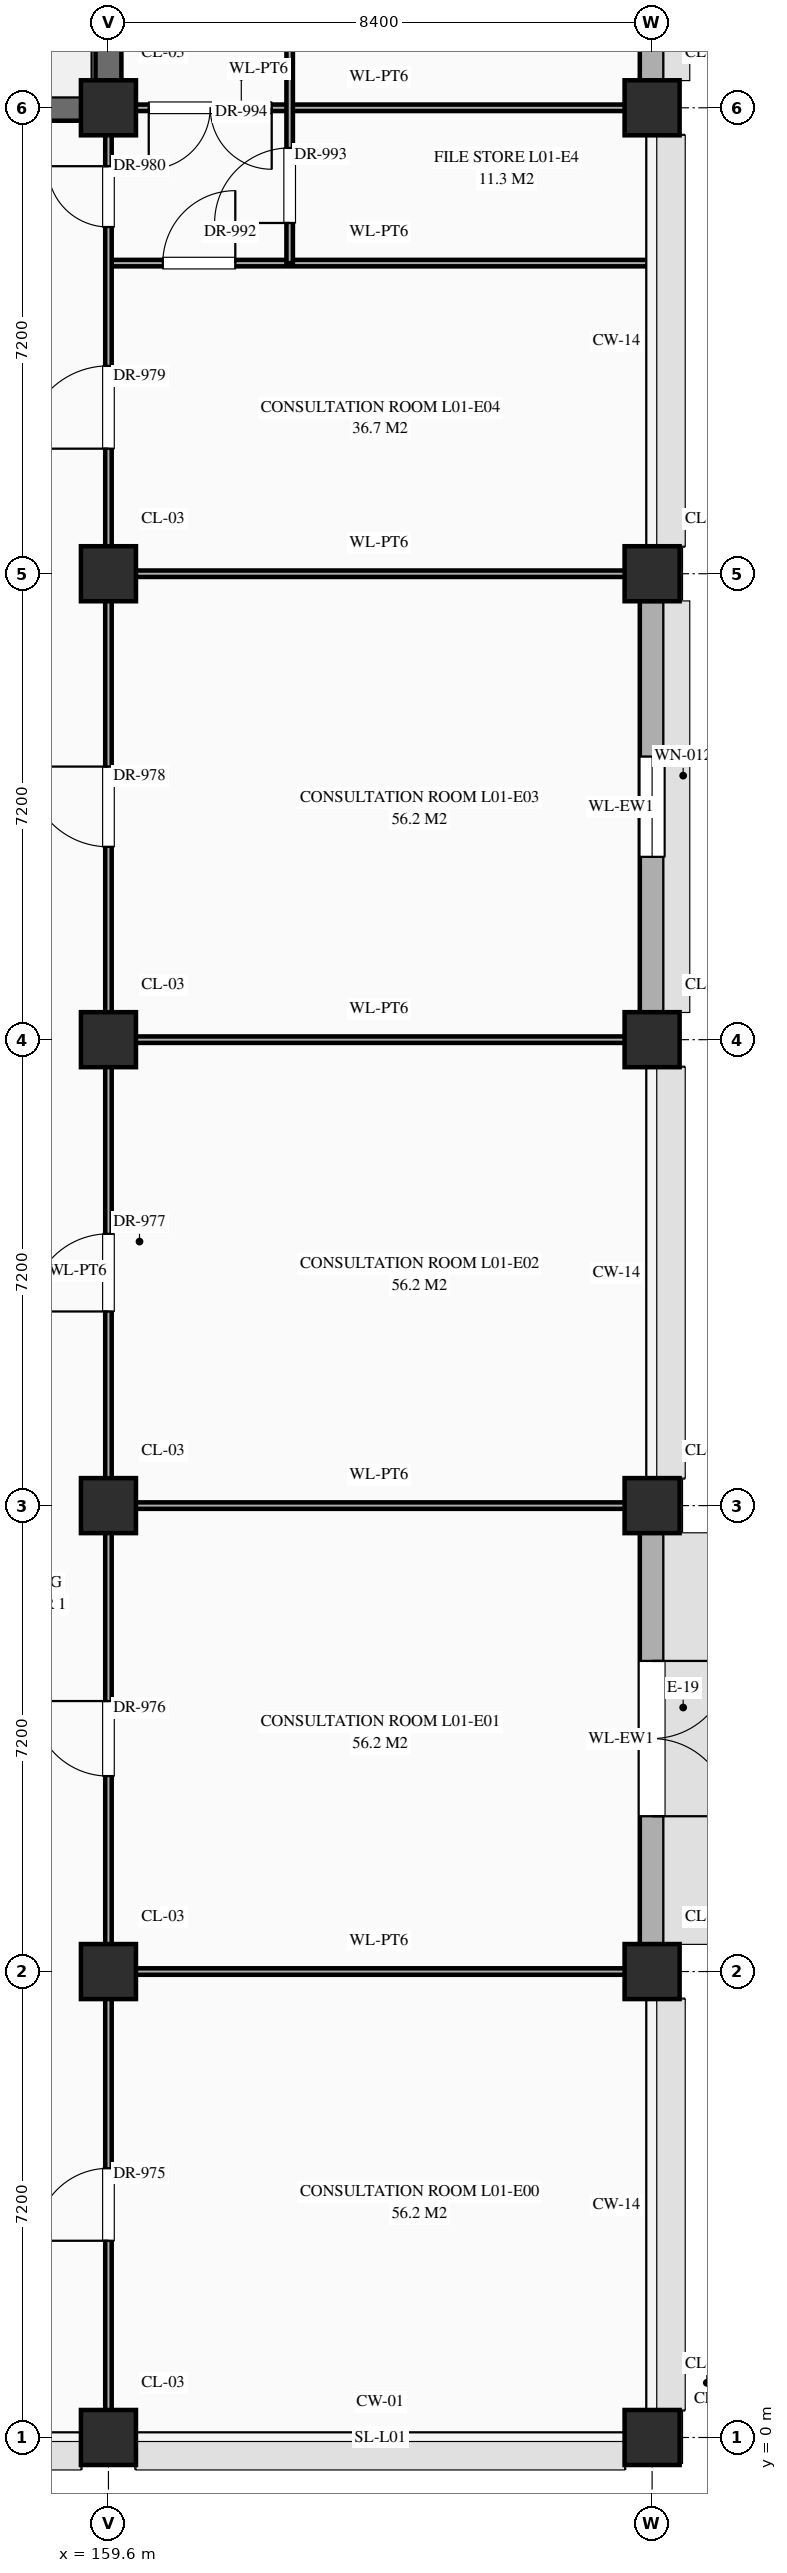
"""IFC4 building model, lengths in metres.
Left out: names, types, materials, properties, quantities, classifications, styles, units other than length and angle.
Written with IfcOpenShell. Run it as: python <this file> out.ifc"""

import sys

from ifc_helpers import new_model, si_unit, direction, frame, frame_2d, origin, origin_2d, place, context, subcontext, project, spatial, rectangle, extrude, element, fill, save


model = new_model("IFC4")
c1 = context("Model", 3, precision=1e-05, world=origin(), true_north=direction((0.0, 1.0)))
c2 = subcontext(c1, "Body", "Model", "MODEL_VIEW")
j1 = project(units=[si_unit("LENGTHUNIT", "METRE"), si_unit("PLANEANGLEUNIT", "RADIAN")], contexts=[c1])
p1 = place(None, origin())
s1 = spatial("IfcSite", under=j1, at=p1, CompositionType="ELEMENT")
p2 = place(p1, origin())
s2 = spatial("IfcBuilding", under=s1, at=p2, CompositionType="ELEMENT")
p3 = place(p2, origin())
s3 = spatial("IfcBuildingStorey", under=s2, at=p3, CompositionType="ELEMENT", Elevation=0.0)
for number, where, z_axis, x_axis in (
    (1, (159.6, 0.0, 0.0), (0.0, 0.0, 1.0), (1.0, 0.0, 0.0)),
    (2, (159.6, 7.2, 0.0), (0.0, 0.0, 1.0), (1.0, 0.0, 0.0)),
    (3, (159.6, 14.4, 0.0), (0.0, 0.0, 1.0), (1.0, 0.0, 0.0)),
    (4, (159.6, 21.6, 0.0), (0.0, 0.0, 1.0), (1.0, 0.0, 0.0)),
    (5, (159.6, 28.8, 0.0), (0.0, 0.0, 1.0), (1.0, 0.0, 0.0)),
    (6, (159.6, 36.0, 0.0), (0.0, 0.0, 1.0), (1.0, 0.0, 0.0)),
    (7, (168.0, 0.0, 0.0), (0.0, 0.0, 1.0), (1.0, 0.0, 0.0)),
    (8, (168.0, 7.2, 0.0), (0.0, 0.0, 1.0), (1.0, 0.0, 0.0)),
    (9, (168.0, 14.4, 0.0), (0.0, 0.0, 1.0), (1.0, 0.0, 0.0)),
    (10, (168.0, 21.6, 0.0), (0.0, 0.0, 1.0), (1.0, 0.0, 0.0)),
    (11, (168.0, 28.8, 0.0), (0.0, 0.0, 1.0), (1.0, 0.0, 0.0)),
    (12, (168.0, 36.0, 0.0), (0.0, 0.0, 1.0), (1.0, 0.0, 0.0)),
):
    element("IfcColumn", number, at=place(p3, frame(where, z_axis=z_axis, x_axis=x_axis)), inside=s3, PredefinedType="COLUMN", context=c2, shape_type="SweptSolid", body=[
        extrude(rectangle(XDim=0.85, YDim=0.85, at=origin_2d()), origin(), (0.0, 0.0, 1.0), 5.4),
    ])
p4 = place(p3, frame((168.0, 7.62, 0.0), z_axis=(0.0, 0.0, 1.0), x_axis=(0.0, 1.0, 0.0)))
e13 = element("IfcWall", 13, at=p4, inside=s3, PredefinedType="STANDARD", context=c2, shape_type="SweptSolid", body=[
    extrude(rectangle(XDim=6.36, YDim=0.38, at=frame_2d((3.18, 0.0))), origin(), (0.0, 0.0, 1.0), 4.47),
])
p5 = place(p4, frame((1.98, 0.0, 0.0)))
e14 = element("IfcOpeningElement", 14, at=p5, cuts=e13, PredefinedType="OPENING", context=c2, shape_type="SweptSolid", body=[
    extrude(rectangle(XDim=2.4, YDim=2.4, at=frame_2d((1.2, 1.2))), frame((0.0, 0.202, 0.0), z_axis=(0.0, -1.0, 0.0), x_axis=(1.0, 0.0, 0.0)), (0.0, 0.0, 1.0), 0.404),
])
p6 = place(p3, frame((168.0, 22.02, 0.0), z_axis=(0.0, 0.0, 1.0), x_axis=(0.0, 1.0, 0.0)))
e15 = element("IfcWall", 15, at=p6, inside=s3, PredefinedType="STANDARD", context=c2, shape_type="SweptSolid", body=[
    extrude(rectangle(XDim=6.36, YDim=0.38, at=frame_2d((3.18, 0.0))), origin(), (0.0, 0.0, 1.0), 4.47),
])
p7 = place(p6, frame((2.405, 0.0, 0.85)))
e16 = element("IfcOpeningElement", 16, at=p7, cuts=e15, PredefinedType="OPENING", context=c2, shape_type="SweptSolid", body=[
    extrude(rectangle(XDim=1.55, YDim=1.92, at=frame_2d((0.775, 0.96))), frame((0.0, 0.202, 0.0), z_axis=(0.0, -1.0, 0.0), x_axis=(1.0, 0.0, 0.0)), (0.0, 0.0, 1.0), 0.404),
])
p8 = place(p3, frame((168.0, 36.42, 0.0), z_axis=(0.0, 0.0, 1.0), x_axis=(0.0, 1.0, 0.0)))
e17 = element("IfcWall", 17, at=p8, inside=s3, PredefinedType="STANDARD", context=c2, shape_type="SweptSolid", body=[
    extrude(rectangle(XDim=6.36, YDim=0.38, at=frame_2d((3.18, 0.0))), origin(), (0.0, 0.0, 1.0), 4.47),
])
p9 = place(p8, frame((2.28, 0.0, 0.85)))
e18 = element("IfcOpeningElement", 18, at=p9, cuts=e17, PredefinedType="OPENING", context=c2, shape_type="SweptSolid", body=[
    extrude(rectangle(XDim=1.8, YDim=1.2, at=frame_2d((0.9, 0.6))), frame((0.0, 0.202, 0.0), z_axis=(0.0, -1.0, 0.0), x_axis=(1.0, 0.0, 0.0)), (0.0, 0.0, 1.0), 0.404),
])
for number, where, z_axis, x_axis in (
    (19, (159.6, 7.2, 0.0), (0.0, 0.0, 1.0), (1.0, 0.0, 0.0)),
    (20, (159.6, 14.4, 0.0), (0.0, 0.0, 1.0), (1.0, 0.0, 0.0)),
    (21, (159.6, 21.6, 0.0), (0.0, 0.0, 1.0), (1.0, 0.0, 0.0)),
    (22, (159.6, 28.8, 0.0), (0.0, 0.0, 1.0), (1.0, 0.0, 0.0)),
):
    element("IfcWall", number, at=place(p3, frame(where, z_axis=z_axis, x_axis=x_axis)), inside=s3, PredefinedType="STANDARD", context=c2, shape_type="SweptSolid", body=[
        extrude(rectangle(XDim=8.36, YDim=0.1, at=frame_2d((4.18, 0.0))), origin(), (0.0, 0.0, 1.0), 4.27),
    ])
p10 = place(p3, frame((159.6, 33.6, 0.0), z_axis=(0.0, 0.0, 1.0), x_axis=(1.0, 0.0, 0.0)))
e23 = element("IfcWall", 23, at=p10, inside=s3, PredefinedType="STANDARD", context=c2, shape_type="SweptSolid", body=[
    extrude(rectangle(XDim=8.36, YDim=0.1, at=frame_2d((4.18, 0.0))), origin(), (0.0, 0.0, 1.0), 5.12),
])
p11 = place(p10, frame((0.84, 0.0, 0.0)))
e24 = element("IfcOpeningElement", 24, at=p11, cuts=e23, PredefinedType="OPENING", context=c2, shape_type="SweptSolid", body=[
    extrude(rectangle(XDim=1.12, YDim=2.25, at=frame_2d((0.56, 1.125))), frame((0.0, 0.062, 0.0), z_axis=(0.0, -1.0, 0.0), x_axis=(1.0, 0.0, 0.0)), (0.0, 0.0, 1.0), 0.124),
])
p12 = place(p3, frame((151.24, 36.0, 0.0), z_axis=(0.0, 0.0, 1.0), x_axis=(1.0, 0.0, 0.0)))
e25 = element("IfcWall", 25, at=p12, inside=s3, PredefinedType="SHEAR", context=c2, shape_type="SweptSolid", body=[
    extrude(rectangle(XDim=8.36, YDim=0.4, at=frame_2d((4.18, 0.0))), origin(), (0.0, 0.0, 1.0), 5.12),
])
p13 = place(p3, frame((159.6, 36.0, 0.0), z_axis=(0.0, 0.0, 1.0), x_axis=(1.0, 0.0, 0.0)))
e26 = element("IfcWall", 26, at=p13, inside=s3, PredefinedType="STANDARD", context=c2, shape_type="SweptSolid", body=[
    extrude(rectangle(XDim=8.36, YDim=0.1, at=frame_2d((4.18, 0.0))), origin(), (0.0, 0.0, 1.0), 4.27),
])
p14 = place(p13, frame((0.623, 0.0, 0.0)))
e27 = element("IfcOpeningElement", 27, at=p14, cuts=e26, PredefinedType="OPENING", context=c2, shape_type="SweptSolid", body=[
    extrude(rectangle(XDim=1.9, YDim=2.5, at=frame_2d((0.95, 1.25))), frame((0.0, 0.062, 0.0), z_axis=(0.0, -1.0, 0.0), x_axis=(1.0, 0.0, 0.0)), (0.0, 0.0, 1.0), 0.124),
])
p15 = place(p3, frame((159.6, 0.04, 0.0), z_axis=(0.0, 0.0, 1.0), x_axis=(0.0, 1.0, 0.0)))
e28 = element("IfcWall", 28, at=p15, inside=s3, PredefinedType="STANDARD", context=c2, shape_type="SweptSolid", body=[
    extrude(rectangle(XDim=35.96, YDim=0.1, at=frame_2d((17.98, 0.0))), origin(), (0.0, 0.0, 1.0), 4.37),
])
p16 = place(p15, frame((3.0, 0.0, 0.0)))
e29 = element("IfcOpeningElement", 29, at=p16, cuts=e28, PredefinedType="OPENING", context=c2, shape_type="SweptSolid", body=[
    extrude(rectangle(XDim=1.12, YDim=2.25, at=frame_2d((0.56, 1.125))), frame((0.0, 0.062, 0.0), z_axis=(0.0, -1.0, 0.0), x_axis=(1.0, 0.0, 0.0)), (0.0, 0.0, 1.0), 0.124),
])
p17 = place(p15, frame((10.18, 0.0, 0.0)))
e30 = element("IfcOpeningElement", 30, at=p17, cuts=e28, PredefinedType="OPENING", context=c2, shape_type="SweptSolid", body=[
    extrude(rectangle(XDim=1.16, YDim=2.3, at=frame_2d((0.58, 1.15))), frame((0.0, 0.062, 0.0), z_axis=(0.0, -1.0, 0.0), x_axis=(1.0, 0.0, 0.0)), (0.0, 0.0, 1.0), 0.124),
])
p18 = place(p15, frame((17.36, 0.0, 0.0)))
e31 = element("IfcOpeningElement", 31, at=p18, cuts=e28, PredefinedType="OPENING", context=c2, shape_type="SweptSolid", body=[
    extrude(rectangle(XDim=1.2, YDim=2.35, at=frame_2d((0.6, 1.175))), frame((0.0, 0.062, 0.0), z_axis=(0.0, -1.0, 0.0), x_axis=(1.0, 0.0, 0.0)), (0.0, 0.0, 1.0), 0.124),
])
p19 = place(p15, frame((24.54, 0.0, 0.0)))
e32 = element("IfcOpeningElement", 32, at=p19, cuts=e28, PredefinedType="OPENING", context=c2, shape_type="SweptSolid", body=[
    extrude(rectangle(XDim=1.24, YDim=2.3, at=frame_2d((0.62, 1.15))), frame((0.0, 0.062, 0.0), z_axis=(0.0, -1.0, 0.0), x_axis=(1.0, 0.0, 0.0)), (0.0, 0.0, 1.0), 0.124),
])
p20 = place(p15, frame((30.692, 0.0, 0.0)))
e33 = element("IfcOpeningElement", 33, at=p20, cuts=e28, PredefinedType="OPENING", context=c2, shape_type="SweptSolid", body=[
    extrude(rectangle(XDim=1.28, YDim=2.35, at=frame_2d((0.64, 1.175))), frame((0.0, 0.062, 0.0), z_axis=(0.0, -1.0, 0.0), x_axis=(1.0, 0.0, 0.0)), (0.0, 0.0, 1.0), 0.124),
])
p21 = place(p15, frame((34.117, 0.0, 0.0)))
e34 = element("IfcOpeningElement", 34, at=p21, cuts=e28, PredefinedType="OPENING", context=c2, shape_type="SweptSolid", body=[
    extrude(rectangle(XDim=0.94, YDim=2.3, at=frame_2d((0.47, 1.15))), frame((0.0, 0.062, 0.0), z_axis=(0.0, -1.0, 0.0), x_axis=(1.0, 0.0, 0.0)), (0.0, 0.0, 1.0), 0.124),
])
p22 = place(p3, frame((159.6, 36.0, 0.0), z_axis=(0.0, 0.0, 1.0), x_axis=(0.0, 1.0, 0.0)))
e35 = element("IfcWall", 35, at=p22, inside=s3, PredefinedType="SHEAR", context=c2, shape_type="SweptSolid", body=[
    extrude(rectangle(XDim=4.8, YDim=0.4, at=frame_2d((2.4, 0.0))), origin(), (0.0, 0.0, 1.0), 5.12),
])
p23 = place(p3, frame((162.4, 33.6, 0.0), z_axis=(0.0, 0.0, 1.0), x_axis=(0.0, 1.0, 0.0)))
e36 = element("IfcWall", 36, at=p23, inside=s3, PredefinedType="STANDARD", context=c2, shape_type="SweptSolid", body=[
    extrude(rectangle(XDim=12.0, YDim=0.1, at=frame_2d((6.0, 0.0))), origin(), (0.0, 0.0, 1.0), 5.12),
])
p24 = place(p23, frame((0.62, 0.0, 0.0)))
e37 = element("IfcOpeningElement", 37, at=p24, cuts=e36, PredefinedType="OPENING", context=c2, shape_type="SweptSolid", body=[
    extrude(rectangle(XDim=1.16, YDim=2.3, at=frame_2d((0.58, 1.15))), frame((0.0, 0.062, 0.0), z_axis=(0.0, -1.0, 0.0), x_axis=(1.0, 0.0, 0.0)), (0.0, 0.0, 1.0), 0.124),
])
p25 = place(p23, frame((5.38, 0.0, 0.0)))
e38 = element("IfcOpeningElement", 38, at=p25, cuts=e36, PredefinedType="OPENING", context=c2, shape_type="SweptSolid", body=[
    extrude(rectangle(XDim=1.24, YDim=2.3, at=frame_2d((0.62, 1.15))), frame((0.0, 0.062, 0.0), z_axis=(0.0, -1.0, 0.0), x_axis=(1.0, 0.0, 0.0)), (0.0, 0.0, 1.0), 0.124),
])
p26 = place(p23, frame((10.33, 0.0, 0.0)))
e39 = element("IfcOpeningElement", 39, at=p26, cuts=e36, PredefinedType="OPENING", context=c2, shape_type="SweptSolid", body=[
    extrude(rectangle(XDim=0.94, YDim=2.3, at=frame_2d((0.47, 1.15))), frame((0.0, 0.062, 0.0), z_axis=(0.0, -1.0, 0.0), x_axis=(1.0, 0.0, 0.0)), (0.0, 0.0, 1.0), 0.124),
])
p27 = place(p5, frame((2.4, 0.0, 0.0), z_axis=(0.0, 0.0, 1.0), x_axis=(-1.0, 0.0, 0.0)))
e40 = element("IfcDoor", 40, at=p27, inside=s3, OperationType="DOUBLE_DOOR_SINGLE_SWING", PredefinedType="DOOR", context=c2, shape_type="SweptSolid", body=[
    extrude(rectangle(XDim=2.4, YDim=2.4, at=frame_2d((1.2, 1.2))), frame((0.0, 0.025, 0.0), z_axis=(0.0, -1.0, 0.0), x_axis=(1.0, 0.0, 0.0)), (0.0, 0.0, 1.0), 0.05),
])
fill(e14, e40)
p28 = place(p7, origin())
e41 = element("IfcWindow", 41, at=p28, inside=s3, PartitioningType="SINGLE_PANEL", PredefinedType="WINDOW", context=c2, shape_type="SweptSolid", body=[
    extrude(rectangle(XDim=1.55, YDim=1.92, at=frame_2d((0.775, 0.96))), frame((0.0, 0.03, 0.0), z_axis=(0.0, -1.0, 0.0), x_axis=(1.0, 0.0, 0.0)), (0.0, 0.0, 1.0), 0.06),
])
fill(e16, e41)
p29 = place(p16, origin())
e42 = element("IfcDoor", 42, at=p29, inside=s3, OperationType="SINGLE_SWING_LEFT", PredefinedType="DOOR", context=c2, shape_type="SweptSolid", body=[
    extrude(rectangle(XDim=1.12, YDim=2.25, at=frame_2d((0.56, 1.125))), frame((0.0, 0.025, 0.0), z_axis=(0.0, -1.0, 0.0), x_axis=(1.0, 0.0, 0.0)), (0.0, 0.0, 1.0), 0.05),
])
fill(e29, e42)
p30 = place(p17, origin())
e43 = element("IfcDoor", 43, at=p30, inside=s3, OperationType="SINGLE_SWING_RIGHT", PredefinedType="DOOR", context=c2, shape_type="SweptSolid", body=[
    extrude(rectangle(XDim=1.16, YDim=2.3, at=frame_2d((0.58, 1.15))), frame((0.0, 0.025, 0.0), z_axis=(0.0, -1.0, 0.0), x_axis=(1.0, 0.0, 0.0)), (0.0, 0.0, 1.0), 0.05),
])
fill(e30, e43)
p31 = place(p18, origin())
e44 = element("IfcDoor", 44, at=p31, inside=s3, OperationType="SINGLE_SWING_LEFT", PredefinedType="DOOR", context=c2, shape_type="SweptSolid", body=[
    extrude(rectangle(XDim=1.2, YDim=2.35, at=frame_2d((0.6, 1.175))), frame((0.0, 0.025, 0.0), z_axis=(0.0, -1.0, 0.0), x_axis=(1.0, 0.0, 0.0)), (0.0, 0.0, 1.0), 0.05),
])
fill(e31, e44)
p32 = place(p19, origin())
e45 = element("IfcDoor", 45, at=p32, inside=s3, OperationType="SINGLE_SWING_RIGHT", PredefinedType="DOOR", context=c2, shape_type="SweptSolid", body=[
    extrude(rectangle(XDim=1.24, YDim=2.3, at=frame_2d((0.62, 1.15))), frame((0.0, 0.025, 0.0), z_axis=(0.0, -1.0, 0.0), x_axis=(1.0, 0.0, 0.0)), (0.0, 0.0, 1.0), 0.05),
])
fill(e32, e45)
p33 = place(p20, origin())
e46 = element("IfcDoor", 46, at=p33, inside=s3, OperationType="SINGLE_SWING_LEFT", PredefinedType="DOOR", context=c2, shape_type="SweptSolid", body=[
    extrude(rectangle(XDim=1.28, YDim=2.35, at=frame_2d((0.64, 1.175))), frame((0.0, 0.025, 0.0), z_axis=(0.0, -1.0, 0.0), x_axis=(1.0, 0.0, 0.0)), (0.0, 0.0, 1.0), 0.05),
])
fill(e33, e46)
p34 = place(p21, origin())
e47 = element("IfcDoor", 47, at=p34, inside=s3, OperationType="SINGLE_SWING_RIGHT", PredefinedType="DOOR", context=c2, shape_type="SweptSolid", body=[
    extrude(rectangle(XDim=0.94, YDim=2.3, at=frame_2d((0.47, 1.15))), frame((0.0, 0.025, 0.0), z_axis=(0.0, -1.0, 0.0), x_axis=(1.0, 0.0, 0.0)), (0.0, 0.0, 1.0), 0.05),
])
fill(e34, e47)
p35 = place(p11, origin())
e48 = element("IfcDoor", 48, at=p35, inside=s3, OperationType="SINGLE_SWING_RIGHT", PredefinedType="DOOR", context=c2, shape_type="SweptSolid", body=[
    extrude(rectangle(XDim=1.12, YDim=2.25, at=frame_2d((0.56, 1.125))), frame((0.0, 0.025, 0.0), z_axis=(0.0, -1.0, 0.0), x_axis=(1.0, 0.0, 0.0)), (0.0, 0.0, 1.0), 0.05),
])
fill(e24, e48)
p36 = place(p24, origin())
e49 = element("IfcDoor", 49, at=p36, inside=s3, OperationType="SINGLE_SWING_LEFT", PredefinedType="DOOR", context=c2, shape_type="SweptSolid", body=[
    extrude(rectangle(XDim=1.16, YDim=2.3, at=frame_2d((0.58, 1.15))), frame((0.0, 0.025, 0.0), z_axis=(0.0, -1.0, 0.0), x_axis=(1.0, 0.0, 0.0)), (0.0, 0.0, 1.0), 0.05),
])
fill(e37, e49)
p37 = place(p14, frame((1.9, 0.0, 0.0), z_axis=(0.0, 0.0, 1.0), x_axis=(-1.0, 0.0, 0.0)))
e50 = element("IfcDoor", 50, at=p37, inside=s3, OperationType="DOUBLE_DOOR_SINGLE_SWING", PredefinedType="DOOR", context=c2, shape_type="SweptSolid", body=[
    extrude(rectangle(XDim=1.9, YDim=2.5, at=frame_2d((0.95, 1.25))), frame((0.0, 0.025, 0.0), z_axis=(0.0, -1.0, 0.0), x_axis=(1.0, 0.0, 0.0)), (0.0, 0.0, 1.0), 0.05),
])
fill(e27, e50)
save(model, sys.argv[1])
